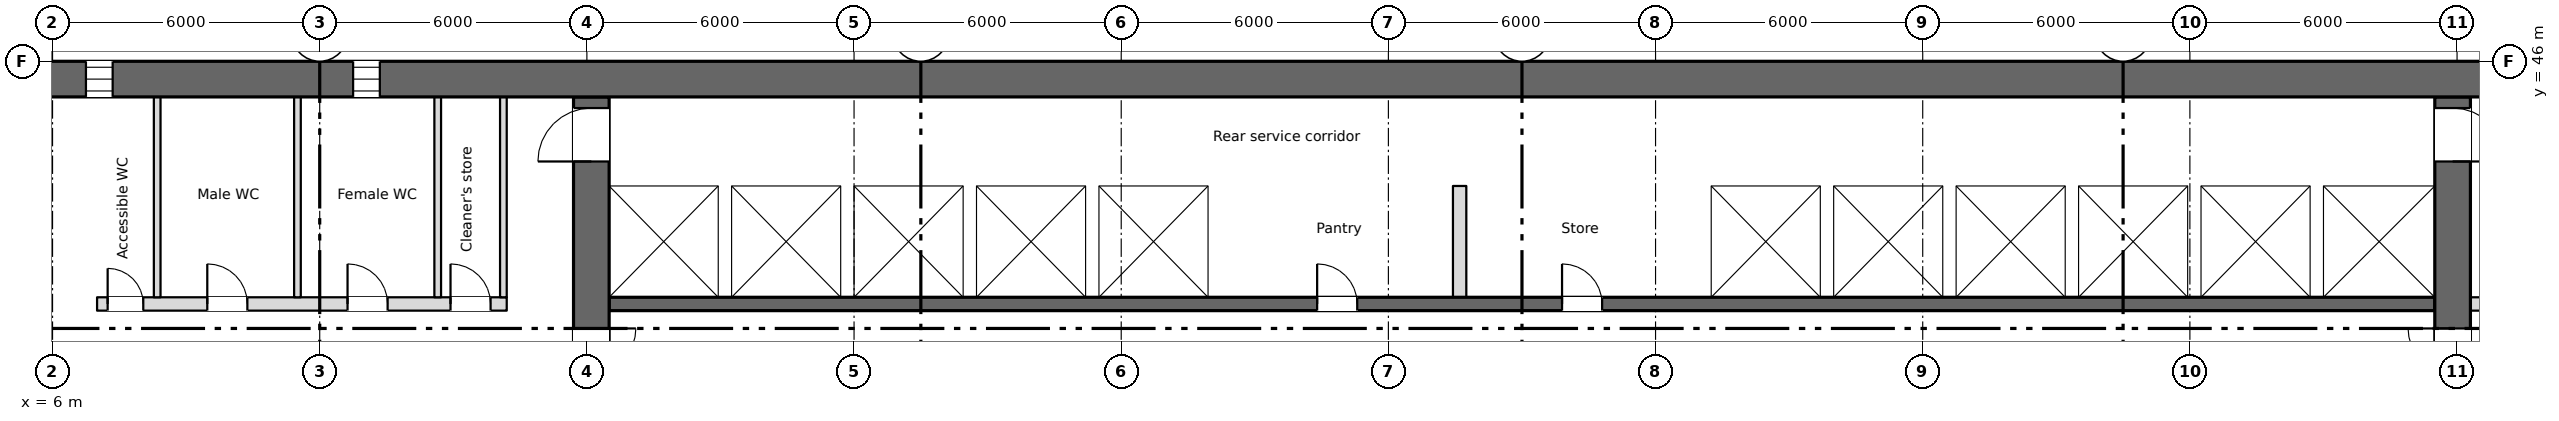
"""IFC4 building model, lengths in metres.
Left out: names, types, materials, properties, quantities, classifications, styles, units other than length and angle.
Written with IfcOpenShell. Run it as: python <this file> out.ifc"""

import sys

from ifc_helpers import new_model, si_unit, direction, frame, frame_2d, origin, place, context, subcontext, project, spatial, rectangle, extrude, element, fill, save


model = new_model("IFC4")
c1 = context("Model", 3, precision=1e-05, world=origin(), true_north=direction((0.0, 1.0)))
c2 = subcontext(c1, "Body", "Model", "MODEL_VIEW")
j1 = project(units=[si_unit("LENGTHUNIT", "METRE"), si_unit("PLANEANGLEUNIT", "RADIAN")], contexts=[c1])
p1 = place(None, origin())
s1 = spatial("IfcSite", under=j1, at=p1, CompositionType="ELEMENT")
p2 = place(p1, origin())
s2 = spatial("IfcBuilding", under=s1, at=p2, CompositionType="ELEMENT")
p3 = place(p2, frame((0.0, 0.0, 110.0)))
s3 = spatial("IfcBuildingStorey", under=s2, at=p3, CompositionType="ELEMENT", Elevation=110.0)
p4 = place(p3, frame((5.55, 45.6, 0.0), z_axis=(0.0, 0.0, 1.0), x_axis=(1.0, 0.0, 0.0)))
e1 = element("IfcWall", 1, at=p4, inside=s3, PredefinedType="SHEAR", context=c2, shape_type="SweptSolid", body=[
    extrude(rectangle(XDim=60.9, YDim=0.8, at=frame_2d((30.45, 0.0))), origin(), (0.0, 0.0, 1.0), 3.35),
])
p5 = place(p4, frame((1.2, 0.0, 0.6)))
e2 = element("IfcOpeningElement", 2, at=p5, cuts=e1, PredefinedType="OPENING", context=c2, shape_type="SweptSolid", body=[
    extrude(rectangle(XDim=0.6, YDim=2.4, at=frame_2d((0.3, 1.2))), frame((0.0, 0.41, 0.0), z_axis=(0.0, -1.0, 0.0), x_axis=(1.0, 0.0, 0.0)), (0.0, 0.0, 1.0), 0.82),
])
p6 = place(p4, frame((7.2, 0.0, 0.6)))
e3 = element("IfcOpeningElement", 3, at=p6, cuts=e1, PredefinedType="OPENING", context=c2, shape_type="SweptSolid", body=[
    extrude(rectangle(XDim=0.6, YDim=2.4, at=frame_2d((0.3, 1.2))), frame((0.0, 0.41, 0.0), z_axis=(0.0, -1.0, 0.0), x_axis=(1.0, 0.0, 0.0)), (0.0, 0.0, 1.0), 0.82),
])
p7 = place(p3, frame((6.85, 28.4, 0.0), z_axis=(0.0, 0.0, 1.0), x_axis=(0.0, 1.0, 0.0)))
e4 = element("IfcWall", 4, at=p7, inside=s3, PredefinedType="SHEAR", context=c2, shape_type="SweptSolid", body=[
    extrude(rectangle(XDim=16.8, YDim=0.3, at=frame_2d((8.4, 0.0))), origin(), (0.0, 0.0, 1.0), 3.35),
])
p8 = place(p3, frame((18.1, 28.4, 0.0), z_axis=(0.0, 0.0, 1.0), x_axis=(0.0, 1.0, 0.0)))
e5 = element("IfcWall", 5, at=p8, inside=s3, PredefinedType="SHEAR", context=c2, shape_type="SweptSolid", body=[
    extrude(rectangle(XDim=16.8, YDim=0.8, at=frame_2d((8.4, 0.0))), origin(), (0.0, 0.0, 1.0), 3.35),
])
p9 = place(p8, frame((9.6, 0.0, 0.0)))
e6 = element("IfcOpeningElement", 6, at=p9, cuts=e5, PredefinedType="OPENING", context=c2, shape_type="SweptSolid", body=[
    extrude(rectangle(XDim=2.0, YDim=2.1, at=frame_2d((1.0, 1.05))), frame((0.0, 0.41, 0.0), z_axis=(0.0, -1.0, 0.0), x_axis=(1.0, 0.0, 0.0)), (0.0, 0.0, 1.0), 0.82),
])
p10 = place(p8, frame((15.35, 0.0, 0.0)))
e7 = element("IfcOpeningElement", 7, at=p10, cuts=e5, PredefinedType="OPENING", context=c2, shape_type="SweptSolid", body=[
    extrude(rectangle(XDim=1.2, YDim=2.1, at=frame_2d((0.6, 1.05))), frame((0.0, 0.41, 0.0), z_axis=(0.0, -1.0, 0.0), x_axis=(1.0, 0.0, 0.0)), (0.0, 0.0, 1.0), 0.82),
])
p11 = place(p3, frame((59.9, 28.4, 0.0), z_axis=(0.0, 0.0, 1.0), x_axis=(0.0, 1.0, 0.0)))
e8 = element("IfcWall", 8, at=p11, inside=s3, PredefinedType="SHEAR", context=c2, shape_type="SweptSolid", body=[
    extrude(rectangle(XDim=16.8, YDim=0.8, at=frame_2d((8.4, 0.0))), origin(), (0.0, 0.0, 1.0), 3.35),
])
p12 = place(p11, frame((9.6, 0.0, 0.0)))
e9 = element("IfcOpeningElement", 9, at=p12, cuts=e8, PredefinedType="OPENING", context=c2, shape_type="SweptSolid", body=[
    extrude(rectangle(XDim=2.0, YDim=2.1, at=frame_2d((1.0, 1.05))), frame((0.0, 0.41, 0.0), z_axis=(0.0, -1.0, 0.0), x_axis=(1.0, 0.0, 0.0)), (0.0, 0.0, 1.0), 0.82),
])
p13 = place(p11, frame((15.35, 0.0, 0.0)))
e10 = element("IfcOpeningElement", 10, at=p13, cuts=e8, PredefinedType="OPENING", context=c2, shape_type="SweptSolid", body=[
    extrude(rectangle(XDim=1.2, YDim=2.1, at=frame_2d((0.6, 1.05))), frame((0.0, 0.41, 0.0), z_axis=(0.0, -1.0, 0.0), x_axis=(1.0, 0.0, 0.0)), (0.0, 0.0, 1.0), 0.82),
])
p14 = place(p3, frame((18.5, 40.55, 0.0), z_axis=(0.0, 0.0, 1.0), x_axis=(1.0, 0.0, 0.0)))
e11 = element("IfcWall", 11, at=p14, inside=s3, PredefinedType="SHEAR", context=c2, shape_type="SweptSolid", body=[
    extrude(rectangle(XDim=41.0, YDim=0.3, at=frame_2d((20.5, 0.0))), origin(), (0.0, 0.0, 1.0), 3.35),
])
p15 = place(p14, frame((15.9, 0.0, 0.0)))
e12 = element("IfcOpeningElement", 12, at=p15, cuts=e11, PredefinedType="OPENING", context=c2, shape_type="SweptSolid", body=[
    extrude(rectangle(XDim=0.9, YDim=2.1, at=frame_2d((0.45, 1.05))), frame((0.0, 0.16, 0.0), z_axis=(0.0, -1.0, 0.0), x_axis=(1.0, 0.0, 0.0)), (0.0, 0.0, 1.0), 0.32),
])
p16 = place(p14, frame((21.4, 0.0, 0.0)))
e13 = element("IfcOpeningElement", 13, at=p16, cuts=e11, PredefinedType="OPENING", context=c2, shape_type="SweptSolid", body=[
    extrude(rectangle(XDim=0.9, YDim=2.1, at=frame_2d((0.45, 1.05))), frame((0.0, 0.16, 0.0), z_axis=(0.0, -1.0, 0.0), x_axis=(1.0, 0.0, 0.0)), (0.0, 0.0, 1.0), 0.32),
])
p17 = place(p14, frame((6.175, 0.0, 0.0)))
e14 = element("IfcOpeningElement", 14, at=p17, cuts=e11, PredefinedType="OPENING", context=c2, shape_type="SweptSolid", body=[
    extrude(rectangle(XDim=1.1, YDim=2.1, at=frame_2d((0.55, 1.05))), frame((0.0, 0.16, 0.0), z_axis=(0.0, -1.0, 0.0), x_axis=(1.0, 0.0, 0.0)), (0.0, 0.0, 1.0), 0.32),
])
p18 = place(p14, frame((8.925, 0.0, 0.0)))
e15 = element("IfcOpeningElement", 15, at=p18, cuts=e11, PredefinedType="OPENING", context=c2, shape_type="SweptSolid", body=[
    extrude(rectangle(XDim=1.1, YDim=2.1, at=frame_2d((0.55, 1.05))), frame((0.0, 0.16, 0.0), z_axis=(0.0, -1.0, 0.0), x_axis=(1.0, 0.0, 0.0)), (0.0, 0.0, 1.0), 0.32),
])
p19 = place(p14, frame((11.675, 0.0, 0.0)))
e16 = element("IfcOpeningElement", 16, at=p19, cuts=e11, PredefinedType="OPENING", context=c2, shape_type="SweptSolid", body=[
    extrude(rectangle(XDim=1.1, YDim=2.1, at=frame_2d((0.55, 1.05))), frame((0.0, 0.16, 0.0), z_axis=(0.0, -1.0, 0.0), x_axis=(1.0, 0.0, 0.0)), (0.0, 0.0, 1.0), 0.32),
])
p20 = place(p14, frame((30.925, 0.0, 0.0)))
e17 = element("IfcOpeningElement", 17, at=p20, cuts=e11, PredefinedType="OPENING", context=c2, shape_type="SweptSolid", body=[
    extrude(rectangle(XDim=1.1, YDim=2.1, at=frame_2d((0.55, 1.05))), frame((0.0, 0.16, 0.0), z_axis=(0.0, -1.0, 0.0), x_axis=(1.0, 0.0, 0.0)), (0.0, 0.0, 1.0), 0.32),
])
p21 = place(p14, frame((33.675, 0.0, 0.0)))
e18 = element("IfcOpeningElement", 18, at=p21, cuts=e11, PredefinedType="OPENING", context=c2, shape_type="SweptSolid", body=[
    extrude(rectangle(XDim=1.1, YDim=2.1, at=frame_2d((0.55, 1.05))), frame((0.0, 0.16, 0.0), z_axis=(0.0, -1.0, 0.0), x_axis=(1.0, 0.0, 0.0)), (0.0, 0.0, 1.0), 0.32),
])
p22 = place(p14, frame((36.375, 0.0, 0.0)))
e19 = element("IfcOpeningElement", 19, at=p22, cuts=e11, PredefinedType="OPENING", context=c2, shape_type="SweptSolid", body=[
    extrude(rectangle(XDim=1.2, YDim=2.1, at=frame_2d((0.6, 1.05))), frame((0.0, 0.16, 0.0), z_axis=(0.0, -1.0, 0.0), x_axis=(1.0, 0.0, 0.0)), (0.0, 0.0, 1.0), 0.32),
])
p23 = place(p14, frame((39.15, 0.0, 0.0)))
e20 = element("IfcOpeningElement", 20, at=p23, cuts=e11, PredefinedType="OPENING", context=c2, shape_type="SweptSolid", body=[
    extrude(rectangle(XDim=1.2, YDim=2.1, at=frame_2d((0.6, 1.05))), frame((0.0, 0.16, 0.0), z_axis=(0.0, -1.0, 0.0), x_axis=(1.0, 0.0, 0.0)), (0.0, 0.0, 1.0), 0.32),
])
p24 = place(p3, frame((18.5, 43.35, 0.0), z_axis=(0.0, 0.0, 1.0), x_axis=(1.0, 0.0, 0.0)))
e21 = element("IfcWall", 21, at=p24, inside=s3, PredefinedType="SHEAR", context=c2, shape_type="SweptSolid", body=[
    extrude(rectangle(XDim=41.0, YDim=0.3, at=frame_2d((20.5, 0.0))), origin(), (0.0, 0.0, 1.0), 3.35),
])
p25 = place(p3, frame((7.0, 40.55, 0.0), z_axis=(0.0, 0.0, 1.0), x_axis=(1.0, 0.0, 0.0)))
e22 = element("IfcWall", 22, at=p25, inside=s3, PredefinedType="PARTITIONING", context=c2, shape_type="SweptSolid", body=[
    extrude(rectangle(XDim=9.2, YDim=0.3, at=frame_2d((4.6, 0.0))), origin(), (0.0, 0.0, 1.0), 3.35),
])
p26 = place(p25, frame((0.238, 0.0, 0.0)))
e23 = element("IfcOpeningElement", 23, at=p26, cuts=e22, PredefinedType="OPENING", context=c2, shape_type="SweptSolid", body=[
    extrude(rectangle(XDim=0.8, YDim=2.1, at=frame_2d((0.4, 1.05))), frame((0.0, 0.16, 0.0), z_axis=(0.0, -1.0, 0.0), x_axis=(1.0, 0.0, 0.0)), (0.0, 0.0, 1.0), 0.32),
])
p27 = place(p25, frame((2.475, 0.0, 0.0)))
e24 = element("IfcOpeningElement", 24, at=p27, cuts=e22, PredefinedType="OPENING", context=c2, shape_type="SweptSolid", body=[
    extrude(rectangle(XDim=0.9, YDim=2.1, at=frame_2d((0.45, 1.05))), frame((0.0, 0.16, 0.0), z_axis=(0.0, -1.0, 0.0), x_axis=(1.0, 0.0, 0.0)), (0.0, 0.0, 1.0), 0.32),
])
p28 = place(p25, frame((5.625, 0.0, 0.0)))
e25 = element("IfcOpeningElement", 25, at=p28, cuts=e22, PredefinedType="OPENING", context=c2, shape_type="SweptSolid", body=[
    extrude(rectangle(XDim=0.9, YDim=2.1, at=frame_2d((0.45, 1.05))), frame((0.0, 0.16, 0.0), z_axis=(0.0, -1.0, 0.0), x_axis=(1.0, 0.0, 0.0)), (0.0, 0.0, 1.0), 0.32),
])
p29 = place(p25, frame((7.938, 0.0, 0.0)))
e26 = element("IfcOpeningElement", 26, at=p29, cuts=e22, PredefinedType="OPENING", context=c2, shape_type="SweptSolid", body=[
    extrude(rectangle(XDim=0.9, YDim=2.1, at=frame_2d((0.45, 1.05))), frame((0.0, 0.16, 0.0), z_axis=(0.0, -1.0, 0.0), x_axis=(1.0, 0.0, 0.0)), (0.0, 0.0, 1.0), 0.32),
])
p30 = place(p3, frame((60.3, 40.55, 0.0), z_axis=(0.0, 0.0, 1.0), x_axis=(1.0, 0.0, 0.0)))
e27 = element("IfcWall", 27, at=p30, inside=s3, PredefinedType="PARTITIONING", context=c2, shape_type="SweptSolid", body=[
    extrude(rectangle(XDim=2.4, YDim=0.3, at=frame_2d((1.2, 0.0))), origin(), (0.0, 0.0, 1.0), 3.35),
])
p31 = place(p30, frame((0.675, 0.0, 0.0)))
e28 = element("IfcOpeningElement", 28, at=p31, cuts=e27, PredefinedType="OPENING", context=c2, shape_type="SweptSolid", body=[
    extrude(rectangle(XDim=0.9, YDim=2.1, at=frame_2d((0.45, 1.05))), frame((0.0, 0.16, 0.0), z_axis=(0.0, -1.0, 0.0), x_axis=(1.0, 0.0, 0.0)), (0.0, 0.0, 1.0), 0.32),
])
for number, where, z_axis, x_axis in (
    (29, (21.1, 40.7, 0.0), (0.0, 0.0, 1.0), (0.0, 1.0, 0.0)),
    (30, (23.85, 40.7, 0.0), (0.0, 0.0, 1.0), (0.0, 1.0, 0.0)),
    (31, (26.6, 40.7, 0.0), (0.0, 0.0, 1.0), (0.0, 1.0, 0.0)),
    (32, (29.35, 40.7, 0.0), (0.0, 0.0, 1.0), (0.0, 1.0, 0.0)),
    (33, (32.1, 40.7, 0.0), (0.0, 0.0, 1.0), (0.0, 1.0, 0.0)),
    (34, (43.1, 40.7, 0.0), (0.0, 0.0, 1.0), (0.0, 1.0, 0.0)),
    (35, (45.85, 40.7, 0.0), (0.0, 0.0, 1.0), (0.0, 1.0, 0.0)),
    (36, (48.6, 40.7, 0.0), (0.0, 0.0, 1.0), (0.0, 1.0, 0.0)),
    (37, (51.35, 40.7, 0.0), (0.0, 0.0, 1.0), (0.0, 1.0, 0.0)),
    (38, (54.1, 40.7, 0.0), (0.0, 0.0, 1.0), (0.0, 1.0, 0.0)),
    (39, (56.85, 40.7, 0.0), (0.0, 0.0, 1.0), (0.0, 1.0, 0.0)),
):
    element("IfcWall", number, at=place(p3, frame(where, z_axis=z_axis, x_axis=x_axis)), inside=s3, PredefinedType="SHEAR", context=c2, shape_type="SweptSolid", body=[
        extrude(rectangle(XDim=2.5, YDim=0.3, at=frame_2d((1.25, 0.0))), origin(), (0.0, 0.0, 1.0), 3.35),
    ])
for number, where, z_axis, x_axis in (
    (40, (16.125, 40.7, 0.0), (0.0, 0.0, 1.0), (0.0, 1.0, 0.0)),
    (41, (8.35, 40.7, 0.0), (0.0, 0.0, 1.0), (0.0, 1.0, 0.0)),
    (42, (11.5, 40.7, 0.0), (0.0, 0.0, 1.0), (0.0, 1.0, 0.0)),
    (43, (14.65, 40.7, 0.0), (0.0, 0.0, 1.0), (0.0, 1.0, 0.0)),
):
    element("IfcWall", number, at=place(p3, frame(where, z_axis=z_axis, x_axis=x_axis)), inside=s3, PredefinedType="PARTITIONING", context=c2, shape_type="SweptSolid", body=[
        extrude(rectangle(XDim=4.5, YDim=0.15, at=frame_2d((2.25, 0.0))), origin(), (0.0, 0.0, 1.0), 3.35),
    ])
p32 = place(p3, frame((37.6, 40.7, 0.0), z_axis=(0.0, 0.0, 1.0), x_axis=(0.0, 1.0, 0.0)))
e44 = element("IfcWall", 44, at=p32, inside=s3, PredefinedType="PARTITIONING", context=c2, shape_type="SweptSolid", body=[
    extrude(rectangle(XDim=2.5, YDim=0.3, at=frame_2d((1.25, 0.0))), origin(), (0.0, 0.0, 1.0), 3.35),
])
p33 = place(p5, origin())
e45 = element("IfcWindow", 45, at=p33, inside=s3, PartitioningType="SINGLE_PANEL", PredefinedType="WINDOW", context=c2, shape_type="SweptSolid", body=[
    extrude(rectangle(XDim=0.6, YDim=2.4, at=frame_2d((0.3, 1.2))), frame((0.0, 0.03, 0.0), z_axis=(0.0, -1.0, 0.0), x_axis=(1.0, 0.0, 0.0)), (0.0, 0.0, 1.0), 0.06),
])
fill(e2, e45)
p34 = place(p6, origin())
e46 = element("IfcWindow", 46, at=p34, inside=s3, PartitioningType="SINGLE_PANEL", PredefinedType="WINDOW", context=c2, shape_type="SweptSolid", body=[
    extrude(rectangle(XDim=0.6, YDim=2.4, at=frame_2d((0.3, 1.2))), frame((0.0, 0.03, 0.0), z_axis=(0.0, -1.0, 0.0), x_axis=(1.0, 0.0, 0.0)), (0.0, 0.0, 1.0), 0.06),
])
fill(e3, e46)
p35 = place(p26, origin())
e47 = element("IfcDoor", 47, at=p35, inside=s3, OperationType="SINGLE_SWING_LEFT", PredefinedType="DOOR", context=c2, shape_type="SweptSolid", body=[
    extrude(rectangle(XDim=0.8, YDim=2.1, at=frame_2d((0.4, 1.05))), frame((0.0, 0.025, 0.0), z_axis=(0.0, -1.0, 0.0), x_axis=(1.0, 0.0, 0.0)), (0.0, 0.0, 1.0), 0.05),
])
fill(e23, e47)
p36 = place(p27, origin())
e48 = element("IfcDoor", 48, at=p36, inside=s3, OperationType="SINGLE_SWING_LEFT", PredefinedType="DOOR", context=c2, shape_type="SweptSolid", body=[
    extrude(rectangle(XDim=0.9, YDim=2.1, at=frame_2d((0.45, 1.05))), frame((0.0, 0.025, 0.0), z_axis=(0.0, -1.0, 0.0), x_axis=(1.0, 0.0, 0.0)), (0.0, 0.0, 1.0), 0.05),
])
fill(e24, e48)
p37 = place(p28, origin())
e49 = element("IfcDoor", 49, at=p37, inside=s3, OperationType="SINGLE_SWING_LEFT", PredefinedType="DOOR", context=c2, shape_type="SweptSolid", body=[
    extrude(rectangle(XDim=0.9, YDim=2.1, at=frame_2d((0.45, 1.05))), frame((0.0, 0.025, 0.0), z_axis=(0.0, -1.0, 0.0), x_axis=(1.0, 0.0, 0.0)), (0.0, 0.0, 1.0), 0.05),
])
fill(e25, e49)
p38 = place(p29, origin())
e50 = element("IfcDoor", 50, at=p38, inside=s3, OperationType="SINGLE_SWING_LEFT", PredefinedType="DOOR", context=c2, shape_type="SweptSolid", body=[
    extrude(rectangle(XDim=0.9, YDim=2.1, at=frame_2d((0.45, 1.05))), frame((0.0, 0.025, 0.0), z_axis=(0.0, -1.0, 0.0), x_axis=(1.0, 0.0, 0.0)), (0.0, 0.0, 1.0), 0.05),
])
fill(e26, e50)
p39 = place(p15, origin())
e51 = element("IfcDoor", 51, at=p39, inside=s3, OperationType="SINGLE_SWING_LEFT", PredefinedType="DOOR", context=c2, shape_type="SweptSolid", body=[
    extrude(rectangle(XDim=0.9, YDim=2.1, at=frame_2d((0.45, 1.05))), frame((0.0, 0.025, 0.0), z_axis=(0.0, -1.0, 0.0), x_axis=(1.0, 0.0, 0.0)), (0.0, 0.0, 1.0), 0.05),
])
fill(e12, e51)
p40 = place(p16, origin())
e52 = element("IfcDoor", 52, at=p40, inside=s3, OperationType="SINGLE_SWING_LEFT", PredefinedType="DOOR", context=c2, shape_type="SweptSolid", body=[
    extrude(rectangle(XDim=0.9, YDim=2.1, at=frame_2d((0.45, 1.05))), frame((0.0, 0.025, 0.0), z_axis=(0.0, -1.0, 0.0), x_axis=(1.0, 0.0, 0.0)), (0.0, 0.0, 1.0), 0.05),
])
fill(e13, e52)
p41 = place(p17, origin())
e53 = element("IfcDoor", 53, at=p41, inside=s3, OperationType="SLIDING_TO_LEFT", PredefinedType="DOOR", context=c2, shape_type="SweptSolid", body=[
    extrude(rectangle(XDim=1.1, YDim=2.1, at=frame_2d((0.55, 1.05))), frame((0.0, 0.025, 0.0), z_axis=(0.0, -1.0, 0.0), x_axis=(1.0, 0.0, 0.0)), (0.0, 0.0, 1.0), 0.05),
])
fill(e14, e53)
p42 = place(p18, origin())
e54 = element("IfcDoor", 54, at=p42, inside=s3, OperationType="SLIDING_TO_LEFT", PredefinedType="DOOR", context=c2, shape_type="SweptSolid", body=[
    extrude(rectangle(XDim=1.1, YDim=2.1, at=frame_2d((0.55, 1.05))), frame((0.0, 0.025, 0.0), z_axis=(0.0, -1.0, 0.0), x_axis=(1.0, 0.0, 0.0)), (0.0, 0.0, 1.0), 0.05),
])
fill(e15, e54)
p43 = place(p19, origin())
e55 = element("IfcDoor", 55, at=p43, inside=s3, OperationType="SLIDING_TO_LEFT", PredefinedType="DOOR", context=c2, shape_type="SweptSolid", body=[
    extrude(rectangle(XDim=1.1, YDim=2.1, at=frame_2d((0.55, 1.05))), frame((0.0, 0.025, 0.0), z_axis=(0.0, -1.0, 0.0), x_axis=(1.0, 0.0, 0.0)), (0.0, 0.0, 1.0), 0.05),
])
fill(e16, e55)
p44 = place(p20, origin())
e56 = element("IfcDoor", 56, at=p44, inside=s3, OperationType="SLIDING_TO_LEFT", PredefinedType="DOOR", context=c2, shape_type="SweptSolid", body=[
    extrude(rectangle(XDim=1.1, YDim=2.1, at=frame_2d((0.55, 1.05))), frame((0.0, 0.025, 0.0), z_axis=(0.0, -1.0, 0.0), x_axis=(1.0, 0.0, 0.0)), (0.0, 0.0, 1.0), 0.05),
])
fill(e17, e56)
p45 = place(p21, origin())
e57 = element("IfcDoor", 57, at=p45, inside=s3, OperationType="SLIDING_TO_LEFT", PredefinedType="DOOR", context=c2, shape_type="SweptSolid", body=[
    extrude(rectangle(XDim=1.1, YDim=2.1, at=frame_2d((0.55, 1.05))), frame((0.0, 0.025, 0.0), z_axis=(0.0, -1.0, 0.0), x_axis=(1.0, 0.0, 0.0)), (0.0, 0.0, 1.0), 0.05),
])
fill(e18, e57)
p46 = place(p22, origin())
e58 = element("IfcDoor", 58, at=p46, inside=s3, OperationType="SLIDING_TO_LEFT", PredefinedType="DOOR", context=c2, shape_type="SweptSolid", body=[
    extrude(rectangle(XDim=1.2, YDim=2.1, at=frame_2d((0.6, 1.05))), frame((0.0, 0.025, 0.0), z_axis=(0.0, -1.0, 0.0), x_axis=(1.0, 0.0, 0.0)), (0.0, 0.0, 1.0), 0.05),
])
fill(e19, e58)
p47 = place(p23, origin())
e59 = element("IfcDoor", 59, at=p47, inside=s3, OperationType="SLIDING_TO_LEFT", PredefinedType="DOOR", context=c2, shape_type="SweptSolid", body=[
    extrude(rectangle(XDim=1.2, YDim=2.1, at=frame_2d((0.6, 1.05))), frame((0.0, 0.025, 0.0), z_axis=(0.0, -1.0, 0.0), x_axis=(1.0, 0.0, 0.0)), (0.0, 0.0, 1.0), 0.05),
])
fill(e20, e59)
p48 = place(p9, origin())
e60 = element("IfcDoor", 60, at=p48, inside=s3, OperationType="DOUBLE_DOOR_SINGLE_SWING", PredefinedType="DOOR", context=c2, shape_type="SweptSolid", body=[
    extrude(rectangle(XDim=2.0, YDim=2.1, at=frame_2d((1.0, 1.05))), frame((0.0, 0.025, 0.0), z_axis=(0.0, -1.0, 0.0), x_axis=(1.0, 0.0, 0.0)), (0.0, 0.0, 1.0), 0.05),
])
fill(e6, e60)
p49 = place(p12, origin())
e61 = element("IfcDoor", 61, at=p49, inside=s3, OperationType="DOUBLE_DOOR_SINGLE_SWING", PredefinedType="DOOR", context=c2, shape_type="SweptSolid", body=[
    extrude(rectangle(XDim=2.0, YDim=2.1, at=frame_2d((1.0, 1.05))), frame((0.0, 0.025, 0.0), z_axis=(0.0, -1.0, 0.0), x_axis=(1.0, 0.0, 0.0)), (0.0, 0.0, 1.0), 0.05),
])
fill(e9, e61)
p50 = place(p10, origin())
e62 = element("IfcDoor", 62, at=p50, inside=s3, OperationType="SINGLE_SWING_LEFT", PredefinedType="DOOR", context=c2, shape_type="SweptSolid", body=[
    extrude(rectangle(XDim=1.2, YDim=2.1, at=frame_2d((0.6, 1.05))), frame((0.0, 0.025, 0.0), z_axis=(0.0, -1.0, 0.0), x_axis=(1.0, 0.0, 0.0)), (0.0, 0.0, 1.0), 0.05),
])
fill(e7, e62)
p51 = place(p13, origin())
e63 = element("IfcDoor", 63, at=p51, inside=s3, OperationType="SINGLE_SWING_LEFT", PredefinedType="DOOR", context=c2, shape_type="SweptSolid", body=[
    extrude(rectangle(XDim=1.2, YDim=2.1, at=frame_2d((0.6, 1.05))), frame((0.0, 0.025, 0.0), z_axis=(0.0, -1.0, 0.0), x_axis=(1.0, 0.0, 0.0)), (0.0, 0.0, 1.0), 0.05),
])
fill(e10, e63)
save(model, sys.argv[1])
